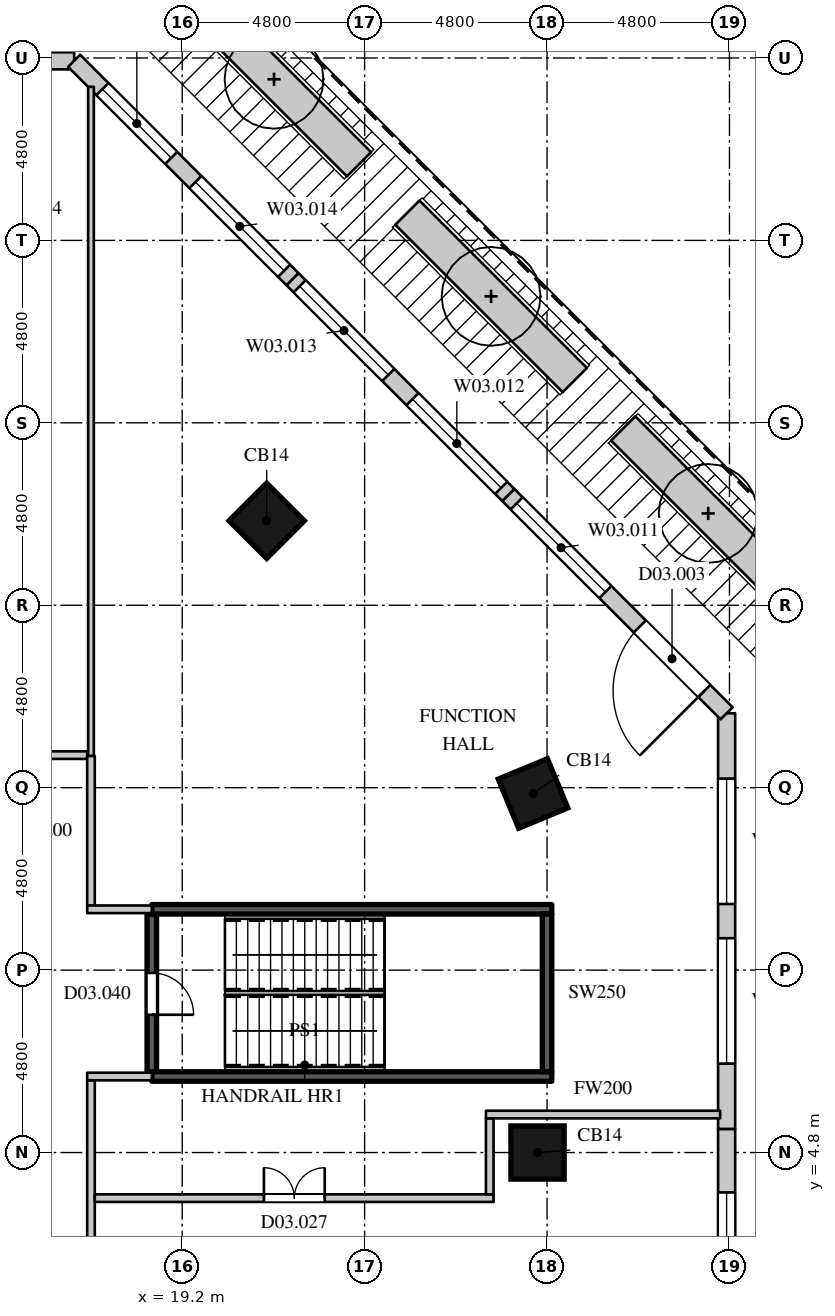
"""IFC4 building model, lengths in metres.
Left out: names, types, materials, properties, quantities, classifications, styles, units other than length and angle.
Written with IfcOpenShell. Run it as: python <this file> out.ifc"""

import sys

from ifc_helpers import new_model, si_unit, direction, frame, frame_2d, origin, origin_2d, place, context, subcontext, project, spatial, rectangle, extrude, element, fill, save


model = new_model("IFC4")
c1 = context("Model", 3, precision=1e-05, world=origin(), true_north=direction((0.0, 1.0)))
c2 = subcontext(c1, "Body", "Model", "MODEL_VIEW")
j1 = project(units=[si_unit("LENGTHUNIT", "METRE"), si_unit("PLANEANGLEUNIT", "RADIAN")], contexts=[c1])
p1 = place(None, origin())
s1 = spatial("IfcSite", under=j1, at=p1, CompositionType="ELEMENT")
p2 = place(p1, origin())
s2 = spatial("IfcBuilding", under=s1, at=p2, CompositionType="ELEMENT")
p3 = place(p2, frame((0.0, 0.0, 16.0)))
s3 = spatial("IfcBuildingStorey", under=s2, at=p3, CompositionType="ELEMENT", Elevation=16.0)
for number, where, z_axis, x_axis in (
    (1, (28.55, 4.8, 0.0), (0.0, 0.0, 1.0), (0.0, 1.0, 0.0)),
    (2, (28.431, 14.247, 0.0), (0.0, 0.0, 1.0), (-0.383, 0.924, 0.0)),
    (3, (21.423, 21.423, 0.0), (0.0, 0.0, 1.0), (-0.707, 0.707, 0.0)),
):
    element("IfcColumn", number, at=place(p3, frame(where, z_axis=z_axis, x_axis=x_axis)), inside=s3, PredefinedType="COLUMN", context=c2, shape_type="SweptSolid", body=[
        extrude(rectangle(XDim=1.4, YDim=1.4, at=origin_2d()), origin(), (0.0, 0.0, 1.0), 5.0),
    ])
p4 = place(p3, frame((33.525, -5.421, 0.0), z_axis=(0.0, 0.0, 1.0), x_axis=(0.0, 1.0, 0.0)))
e4 = element("IfcWall", 4, at=p4, inside=s3, PredefinedType="ELEMENTEDWALL", context=c2, shape_type="SweptSolid", body=[
    extrude(rectangle(XDim=10.843, YDim=0.45, at=frame_2d((5.421, 0.0))), origin(), (0.0, 0.0, 1.0), 4.7),
])
p5 = place(p4, frame((1.511, 0.0, 0.0)))
e5 = element("IfcOpeningElement", 5, at=p5, cuts=e4, PredefinedType="OPENING", context=c2, shape_type="SweptSolid", body=[
    extrude(rectangle(XDim=2.4, YDim=2.7, at=frame_2d((1.2, 1.35))), frame((0.0, 0.235, 0.0), z_axis=(0.0, -1.0, 0.0), x_axis=(1.0, 0.0, 0.0)), (0.0, 0.0, 1.0), 0.47),
])
p6 = place(p4, frame((5.871, 0.0, 1.05)))
e6 = element("IfcOpeningElement", 6, at=p6, cuts=e4, PredefinedType="OPENING", context=c2, shape_type="SweptSolid", body=[
    extrude(rectangle(XDim=3.3, YDim=2.7, at=frame_2d((1.65, 1.35))), frame((0.0, 0.235, 0.0), z_axis=(0.0, -1.0, 0.0), x_axis=(1.0, 0.0, 0.0)), (0.0, 0.0, 1.0), 0.47),
])
p7 = place(p3, frame((33.525, 5.421, 0.0), z_axis=(0.0, 0.0, 1.0), x_axis=(0.0, 1.0, 0.0)))
e7 = element("IfcWall", 7, at=p7, inside=s3, PredefinedType="ELEMENTEDWALL", context=c2, shape_type="SweptSolid", body=[
    extrude(rectangle(XDim=10.936, YDim=0.45, at=frame_2d((5.468, 0.0))), origin(), (0.0, 0.0, 1.0), 4.7),
])
p8 = place(p7, frame((1.718, 0.0, 1.05)))
e8 = element("IfcOpeningElement", 8, at=p8, cuts=e7, PredefinedType="OPENING", context=c2, shape_type="SweptSolid", body=[
    extrude(rectangle(XDim=3.3, YDim=2.7, at=frame_2d((1.65, 1.35))), frame((0.0, 0.235, 0.0), z_axis=(0.0, -1.0, 0.0), x_axis=(1.0, 0.0, 0.0)), (0.0, 0.0, 1.0), 0.47),
])
p9 = place(p7, frame((5.918, 0.0, 1.05)))
e9 = element("IfcOpeningElement", 9, at=p9, cuts=e7, PredefinedType="OPENING", context=c2, shape_type="SweptSolid", body=[
    extrude(rectangle(XDim=3.3, YDim=2.7, at=frame_2d((1.65, 1.35))), frame((0.0, 0.235, 0.0), z_axis=(0.0, -1.0, 0.0), x_axis=(1.0, 0.0, 0.0)), (0.0, 0.0, 1.0), 0.47),
])
p10 = place(p3, frame((33.525, 16.357, 0.0), z_axis=(0.0, 0.0, 1.0), x_axis=(-0.707091755064, 0.70712180699, 0.0)))
e10 = element("IfcWall", 10, at=p10, inside=s3, PredefinedType="ELEMENTEDWALL", context=c2, shape_type="SweptSolid", body=[
    extrude(rectangle(XDim=8.124, YDim=0.45, at=frame_2d((4.062, 0.0))), origin(), (0.0, 0.0, 1.0), 4.7),
])
p11 = place(p10, frame((0.831, 0.0, 0.0)))
e11 = element("IfcOpeningElement", 11, at=p11, cuts=e10, PredefinedType="OPENING", context=c2, shape_type="SweptSolid", body=[
    extrude(rectangle(XDim=2.4, YDim=2.7, at=frame_2d((1.2, 1.35))), frame((0.0, 0.235, 0.0), z_axis=(0.0, -1.0, 0.0), x_axis=(1.0, 0.0, 0.0)), (0.0, 0.0, 1.0), 0.47),
])
p12 = place(p10, frame((4.512, 0.0, 1.05)))
e12 = element("IfcOpeningElement", 12, at=p12, cuts=e10, PredefinedType="OPENING", context=c2, shape_type="SweptSolid", body=[
    extrude(rectangle(XDim=3.3, YDim=2.7, at=frame_2d((1.65, 1.35))), frame((0.0, 0.235, 0.0), z_axis=(0.0, -1.0, 0.0), x_axis=(1.0, 0.0, 0.0)), (0.0, 0.0, 1.0), 0.47),
])
p13 = place(p3, frame((27.781, 22.102, 0.0), z_axis=(0.0, 0.0, 1.0), x_axis=(-0.707106781187, 0.707106781187, 0.0)))
e13 = element("IfcWall", 13, at=p13, inside=s3, PredefinedType="ELEMENTEDWALL", context=c2, shape_type="SweptSolid", body=[
    extrude(rectangle(XDim=8.031, YDim=0.45, at=frame_2d((4.016, 0.0))), origin(), (0.0, 0.0, 1.0), 4.7),
])
p14 = place(p13, frame((0.265, 0.0, 1.05)))
e14 = element("IfcOpeningElement", 14, at=p14, cuts=e13, PredefinedType="OPENING", context=c2, shape_type="SweptSolid", body=[
    extrude(rectangle(XDim=3.3, YDim=2.7, at=frame_2d((1.65, 1.35))), frame((0.0, 0.235, 0.0), z_axis=(0.0, -1.0, 0.0), x_axis=(1.0, 0.0, 0.0)), (0.0, 0.0, 1.0), 0.47),
])
p15 = place(p13, frame((4.465, 0.0, 1.05)))
e15 = element("IfcOpeningElement", 15, at=p15, cuts=e13, PredefinedType="OPENING", context=c2, shape_type="SweptSolid", body=[
    extrude(rectangle(XDim=3.3, YDim=2.7, at=frame_2d((1.65, 1.35))), frame((0.0, 0.235, 0.0), z_axis=(0.0, -1.0, 0.0), x_axis=(1.0, 0.0, 0.0)), (0.0, 0.0, 1.0), 0.47),
])
p16 = place(p3, frame((22.102, 27.781, 0.0), z_axis=(0.0, 0.0, 1.0), x_axis=(-0.70712180699, 0.707091755064, 0.0)))
e16 = element("IfcWall", 16, at=p16, inside=s3, PredefinedType="ELEMENTEDWALL", context=c2, shape_type="SweptSolid", body=[
    extrude(rectangle(XDim=8.124, YDim=0.45, at=frame_2d((4.062, 0.0))), origin(), (0.0, 0.0, 1.0), 4.7),
])
p17 = place(p16, frame((0.312, 0.0, 1.05)))
e17 = element("IfcOpeningElement", 17, at=p17, cuts=e16, PredefinedType="OPENING", context=c2, shape_type="SweptSolid", body=[
    extrude(rectangle(XDim=3.3, YDim=2.7, at=frame_2d((1.65, 1.35))), frame((0.0, 0.235, 0.0), z_axis=(0.0, -1.0, 0.0), x_axis=(1.0, 0.0, 0.0)), (0.0, 0.0, 1.0), 0.47),
])
p18 = place(p16, frame((4.512, 0.0, 1.05)))
e18 = element("IfcOpeningElement", 18, at=p18, cuts=e16, PredefinedType="OPENING", context=c2, shape_type="SweptSolid", body=[
    extrude(rectangle(XDim=2.56, YDim=2.7, at=frame_2d((1.28, 1.35))), frame((0.0, 0.235, 0.0), z_axis=(0.0, -1.0, 0.0), x_axis=(1.0, 0.0, 0.0)), (0.0, 0.0, 1.0), 0.47),
])
p19 = place(p3, frame((16.357, 33.525, 0.0), z_axis=(0.0, 0.0, 1.0), x_axis=(-1.0, 0.0, 0.0)))
e19 = element("IfcWall", 19, at=p19, inside=s3, PredefinedType="ELEMENTEDWALL", context=c2, shape_type="SweptSolid", body=[
    extrude(rectangle(XDim=10.936, YDim=0.45, at=frame_2d((5.468, 0.0))), origin(), (0.0, 0.0, 1.0), 4.7),
])
p20 = place(p19, frame((1.718, 0.0, 1.05)))
e20 = element("IfcOpeningElement", 20, at=p20, cuts=e19, PredefinedType="OPENING", context=c2, shape_type="SweptSolid", body=[
    extrude(rectangle(XDim=3.3, YDim=2.7, at=frame_2d((1.65, 1.35))), frame((0.0, 0.235, 0.0), z_axis=(0.0, -1.0, 0.0), x_axis=(1.0, 0.0, 0.0)), (0.0, 0.0, 1.0), 0.47),
])
p21 = place(p19, frame((5.918, 0.0, 1.05)))
e21 = element("IfcOpeningElement", 21, at=p21, cuts=e19, PredefinedType="OPENING", context=c2, shape_type="SweptSolid", body=[
    extrude(rectangle(XDim=3.3, YDim=2.7, at=frame_2d((1.65, 1.35))), frame((0.0, 0.235, 0.0), z_axis=(0.0, -1.0, 0.0), x_axis=(1.0, 0.0, 0.0)), (0.0, 0.0, 1.0), 0.47),
])
p22 = place(p3, frame((35.275, 19.38, 0.0), z_axis=(0.0, 0.0, 1.0), x_axis=(-0.707126083377, 0.70708747847, 0.0)))
e22 = element("IfcWall", 22, at=p22, inside=s3, PredefinedType="USERDEFINED", context=c2, shape_type="SweptSolid", body=[
    extrude(rectangle(XDim=6.324, YDim=0.9, at=frame_2d((3.162, 0.0))), origin(), (0.0, 0.0, 1.0), 0.9),
])
p23 = place(p3, frame((29.531, 25.125, 0.0), z_axis=(0.0, 0.0, 1.0), x_axis=(-0.707106781187, 0.707106781187, 0.0)))
e23 = element("IfcWall", 23, at=p23, inside=s3, PredefinedType="USERDEFINED", context=c2, shape_type="SweptSolid", body=[
    extrude(rectangle(XDim=6.231, YDim=0.9, at=frame_2d((3.115, 0.0))), origin(), (0.0, 0.0, 1.0), 0.9),
])
p24 = place(p3, frame((23.852, 30.803, 0.0), z_axis=(0.0, 0.0, 1.0), x_axis=(-0.70708747847, 0.707126083377, 0.0)))
e24 = element("IfcWall", 24, at=p24, inside=s3, PredefinedType="USERDEFINED", context=c2, shape_type="SweptSolid", body=[
    extrude(rectangle(XDim=6.324, YDim=0.9, at=frame_2d((3.162, 0.0))), origin(), (0.0, 0.0, 1.0), 0.9),
])
p25 = place(p3, frame((11.1, 15.257, 0.0), z_axis=(0.0, 0.0, 1.0), x_axis=(1.0, 0.0, 0.0)))
e25 = element("IfcWall", 25, at=p25, inside=s3, PredefinedType="PARTITIONING", context=c2, shape_type="SweptSolid", body=[
    extrude(rectangle(XDim=5.6, YDim=0.2, at=frame_2d((2.8, 0.0))), origin(), (0.0, 0.0, 1.0), 4.4),
])
p26 = place(p3, frame((16.8, -6.7, 0.0), z_axis=(0.0, 0.0, 1.0), x_axis=(0.0, 1.0, 0.0)))
e26 = element("IfcWall", 26, at=p26, inside=s3, PredefinedType="PARTITIONING", context=c2, shape_type="SweptSolid", body=[
    extrude(rectangle(XDim=13.4, YDim=0.2, at=frame_2d((6.7, 0.0))), origin(), (0.0, 0.0, 1.0), 4.4),
])
p27 = place(p26, frame((5.95, 0.0, 0.0)))
e27 = element("IfcOpeningElement", 27, at=p27, cuts=e26, PredefinedType="OPENING", context=c2, shape_type="SweptSolid", body=[
    extrude(rectangle(XDim=1.5, YDim=2.2, at=frame_2d((0.75, 1.1))), frame((0.0, 0.11, 0.0), z_axis=(0.0, -1.0, 0.0), x_axis=(1.0, 0.0, 0.0)), (0.0, 0.0, 1.0), 0.22),
])
p28 = place(p3, frame((16.9, 3.6, 0.0), z_axis=(0.0, 0.0, 1.0), x_axis=(1.0, 0.0, 0.0)))
e28 = element("IfcWall", 28, at=p28, inside=s3, PredefinedType="PARTITIONING", context=c2, shape_type="SweptSolid", body=[
    extrude(rectangle(XDim=10.492, YDim=0.2, at=frame_2d((5.246, 0.0))), origin(), (0.0, 0.0, 1.0), 4.4),
])
p29 = place(p28, frame((4.45, 0.0, 0.0)))
e29 = element("IfcOpeningElement", 29, at=p29, cuts=e28, PredefinedType="OPENING", context=c2, shape_type="SweptSolid", body=[
    extrude(rectangle(XDim=1.6, YDim=2.4, at=frame_2d((0.8, 1.2))), frame((0.0, 0.11, 0.0), z_axis=(0.0, -1.0, 0.0), x_axis=(1.0, 0.0, 0.0)), (0.0, 0.0, 1.0), 0.22),
])
p30 = place(p3, frame((16.7, 6.8, 0.0), z_axis=(0.0, 0.0, 1.0), x_axis=(1.0, 0.0, 0.0)))
e30 = element("IfcWall", 30, at=p30, inside=s3, PredefinedType="PARTITIONING", context=c2, shape_type="SweptSolid", body=[
    extrude(rectangle(XDim=1.7, YDim=0.2, at=frame_2d((0.85, 0.0))), origin(), (0.0, 0.0, 1.0), 4.4),
])
p31 = place(p3, frame((16.8, 11.3, 0.0), z_axis=(0.0, 0.0, 1.0), x_axis=(0.0, 1.0, 0.0)))
e31 = element("IfcWall", 31, at=p31, inside=s3, PredefinedType="PARTITIONING", context=c2, shape_type="SweptSolid", body=[
    extrude(rectangle(XDim=3.937, YDim=0.2, at=frame_2d((1.968, 0.0))), origin(), (0.0, 0.0, 1.0), 4.4),
])
p32 = place(p3, frame((16.7, 11.2, 0.0), z_axis=(0.0, 0.0, 1.0), x_axis=(1.0, 0.0, 0.0)))
e32 = element("IfcWall", 32, at=p32, inside=s3, PredefinedType="PARTITIONING", context=c2, shape_type="SweptSolid", body=[
    extrude(rectangle(XDim=1.7, YDim=0.2, at=frame_2d((0.85, 0.0))), origin(), (0.0, 0.0, 1.0), 4.4),
])
p33 = place(p3, frame((27.292, 3.7, 0.0), z_axis=(0.0, 0.0, 1.0), x_axis=(0.0, 1.0, 0.0)))
e33 = element("IfcWall", 33, at=p33, inside=s3, PredefinedType="PARTITIONING", context=c2, shape_type="SweptSolid", body=[
    extrude(rectangle(XDim=2.0, YDim=0.2, at=frame_2d((1.0, 0.0))), origin(), (0.0, 0.0, 1.0), 4.4),
])
p34 = place(p3, frame((27.192, 5.8, 0.0), z_axis=(0.0, 0.0, 1.0), x_axis=(1.0, 0.0, 0.0)))
e34 = element("IfcWall", 34, at=p34, inside=s3, PredefinedType="PARTITIONING", context=c2, shape_type="SweptSolid", body=[
    extrude(rectangle(XDim=6.163, YDim=0.2, at=frame_2d((3.082, 0.0))), origin(), (0.0, 0.0, 1.0), 4.4),
])
p35 = place(p3, frame((16.8, 15.237, 0.0), z_axis=(0.0, 0.0, 1.0), x_axis=(0.0, 1.0, 0.0)))
e35 = element("IfcWall", 35, at=p35, inside=s3, PredefinedType="PARTITIONING", context=c2, shape_type="SweptSolid", body=[
    extrude(rectangle(XDim=17.605, YDim=0.15, at=frame_2d((8.802, 0.0))), origin(), (0.0, 0.0, 1.0), 4.4),
])
p36 = place(p3, frame((18.4, 6.925, 0.0), z_axis=(0.0, 0.0, 1.0), x_axis=(0.0, 1.0, 0.0)))
e36 = element("IfcWall", 36, at=p36, inside=s3, PredefinedType="SHEAR", context=c2, shape_type="SweptSolid", body=[
    extrude(rectangle(XDim=4.15, YDim=0.25, at=frame_2d((2.075, 0.0))), origin(), (0.0, 0.0, 1.0), 4.65),
])
p37 = place(p36, frame((1.5, 0.0, 0.0)))
e37 = element("IfcOpeningElement", 37, at=p37, cuts=e36, PredefinedType="OPENING", context=c2, shape_type="SweptSolid", body=[
    extrude(rectangle(XDim=1.1, YDim=2.2, at=frame_2d((0.55, 1.1))), frame((0.0, 0.135, 0.0), z_axis=(0.0, -1.0, 0.0), x_axis=(1.0, 0.0, 0.0)), (0.0, 0.0, 1.0), 0.27),
])
for number, where, z_axis, x_axis in (
    (38, (18.4, 6.8, 0.0), (0.0, 0.0, 1.0), (1.0, 0.0, 0.0)),
    (39, (18.4, 11.2, 0.0), (0.0, 0.0, 1.0), (1.0, 0.0, 0.0)),
):
    element("IfcWall", number, at=place(p3, frame(where, z_axis=z_axis, x_axis=x_axis)), inside=s3, PredefinedType="SHEAR", context=c2, shape_type="SweptSolid", body=[
        extrude(rectangle(XDim=10.525, YDim=0.25, at=frame_2d((5.263, 0.0))), origin(), (0.0, 0.0, 1.0), 4.65),
    ])
p38 = place(p3, frame((28.8, 6.925, 0.0), z_axis=(0.0, 0.0, 1.0), x_axis=(0.0, 1.0, 0.0)))
e40 = element("IfcWall", 40, at=p38, inside=s3, PredefinedType="SHEAR", context=c2, shape_type="SweptSolid", body=[
    extrude(rectangle(XDim=4.15, YDim=0.25, at=frame_2d((2.075, 0.0))), origin(), (0.0, 0.0, 1.0), 4.65),
])
p39 = place(p6, origin())
e41 = element("IfcWindow", 41, at=p39, inside=s3, PartitioningType="SINGLE_PANEL", PredefinedType="WINDOW", context=c2, shape_type="SweptSolid", body=[
    extrude(rectangle(XDim=3.3, YDim=2.7, at=frame_2d((1.65, 1.35))), frame((0.0, 0.135, 0.0), z_axis=(0.0, -1.0, 0.0), x_axis=(1.0, 0.0, 0.0)), (0.0, 0.0, 1.0), 0.06),
])
fill(e6, e41)
p40 = place(p8, origin())
e42 = element("IfcWindow", 42, at=p40, inside=s3, PartitioningType="SINGLE_PANEL", PredefinedType="WINDOW", context=c2, shape_type="SweptSolid", body=[
    extrude(rectangle(XDim=3.3, YDim=2.7, at=frame_2d((1.65, 1.35))), frame((0.0, 0.135, 0.0), z_axis=(0.0, -1.0, 0.0), x_axis=(1.0, 0.0, 0.0)), (0.0, 0.0, 1.0), 0.06),
])
fill(e8, e42)
p41 = place(p9, origin())
e43 = element("IfcWindow", 43, at=p41, inside=s3, PartitioningType="SINGLE_PANEL", PredefinedType="WINDOW", context=c2, shape_type="SweptSolid", body=[
    extrude(rectangle(XDim=3.3, YDim=2.7, at=frame_2d((1.65, 1.35))), frame((0.0, 0.135, 0.0), z_axis=(0.0, -1.0, 0.0), x_axis=(1.0, 0.0, 0.0)), (0.0, 0.0, 1.0), 0.06),
])
fill(e9, e43)
p42 = place(p11, origin())
e44 = element("IfcDoor", 44, at=p42, inside=s3, OperationType="SINGLE_SWING_LEFT", PredefinedType="DOOR", context=c2, shape_type="SweptSolid", body=[
    extrude(rectangle(XDim=2.4, YDim=2.7, at=frame_2d((1.2, 1.35))), frame((0.0, 0.13, 0.0), z_axis=(0.0, -1.0, 0.0), x_axis=(1.0, 0.0, 0.0)), (0.0, 0.0, 1.0), 0.05),
])
fill(e11, e44)
p43 = place(p12, origin())
e45 = element("IfcWindow", 45, at=p43, inside=s3, PartitioningType="SINGLE_PANEL", PredefinedType="WINDOW", context=c2, shape_type="SweptSolid", body=[
    extrude(rectangle(XDim=3.3, YDim=2.7, at=frame_2d((1.65, 1.35))), frame((0.0, 0.135, 0.0), z_axis=(0.0, -1.0, 0.0), x_axis=(1.0, 0.0, 0.0)), (0.0, 0.0, 1.0), 0.06),
])
fill(e12, e45)
p44 = place(p14, origin())
e46 = element("IfcWindow", 46, at=p44, inside=s3, PartitioningType="SINGLE_PANEL", PredefinedType="WINDOW", context=c2, shape_type="SweptSolid", body=[
    extrude(rectangle(XDim=3.3, YDim=2.7, at=frame_2d((1.65, 1.35))), frame((0.0, 0.135, 0.0), z_axis=(0.0, -1.0, 0.0), x_axis=(1.0, 0.0, 0.0)), (0.0, 0.0, 1.0), 0.06),
])
fill(e14, e46)
p45 = place(p15, origin())
e47 = element("IfcWindow", 47, at=p45, inside=s3, PartitioningType="SINGLE_PANEL", PredefinedType="WINDOW", context=c2, shape_type="SweptSolid", body=[
    extrude(rectangle(XDim=3.3, YDim=2.7, at=frame_2d((1.65, 1.35))), frame((0.0, 0.135, 0.0), z_axis=(0.0, -1.0, 0.0), x_axis=(1.0, 0.0, 0.0)), (0.0, 0.0, 1.0), 0.06),
])
fill(e15, e47)
p46 = place(p17, origin())
e48 = element("IfcWindow", 48, at=p46, inside=s3, PartitioningType="SINGLE_PANEL", PredefinedType="WINDOW", context=c2, shape_type="SweptSolid", body=[
    extrude(rectangle(XDim=3.3, YDim=2.7, at=frame_2d((1.65, 1.35))), frame((0.0, 0.135, 0.0), z_axis=(0.0, -1.0, 0.0), x_axis=(1.0, 0.0, 0.0)), (0.0, 0.0, 1.0), 0.06),
])
fill(e17, e48)
p47 = place(p18, origin())
e49 = element("IfcWindow", 49, at=p47, inside=s3, PartitioningType="SINGLE_PANEL", PredefinedType="WINDOW", context=c2, shape_type="SweptSolid", body=[
    extrude(rectangle(XDim=2.56, YDim=2.7, at=frame_2d((1.28, 1.35))), frame((0.0, 0.135, 0.0), z_axis=(0.0, -1.0, 0.0), x_axis=(1.0, 0.0, 0.0)), (0.0, 0.0, 1.0), 0.06),
])
fill(e18, e49)
p48 = place(p29, origin())
e50 = element("IfcDoor", 50, at=p48, inside=s3, OperationType="DOUBLE_DOOR_SINGLE_SWING", PredefinedType="DOOR", context=c2, shape_type="SweptSolid", body=[
    extrude(rectangle(XDim=1.6, YDim=2.4, at=frame_2d((0.8, 1.2))), frame((0.0, 0.025, 0.0), z_axis=(0.0, -1.0, 0.0), x_axis=(1.0, 0.0, 0.0)), (0.0, 0.0, 1.0), 0.05),
])
fill(e29, e50)
p49 = place(p37, origin())
e51 = element("IfcDoor", 51, at=p49, inside=s3, OperationType="SINGLE_SWING_RIGHT", PredefinedType="DOOR", context=c2, shape_type="SweptSolid", body=[
    extrude(rectangle(XDim=1.1, YDim=2.2, at=frame_2d((0.55, 1.1))), frame((0.0, 0.025, 0.0), z_axis=(0.0, -1.0, 0.0), x_axis=(1.0, 0.0, 0.0)), (0.0, 0.0, 1.0), 0.05),
])
fill(e37, e51)
save(model, sys.argv[1])
